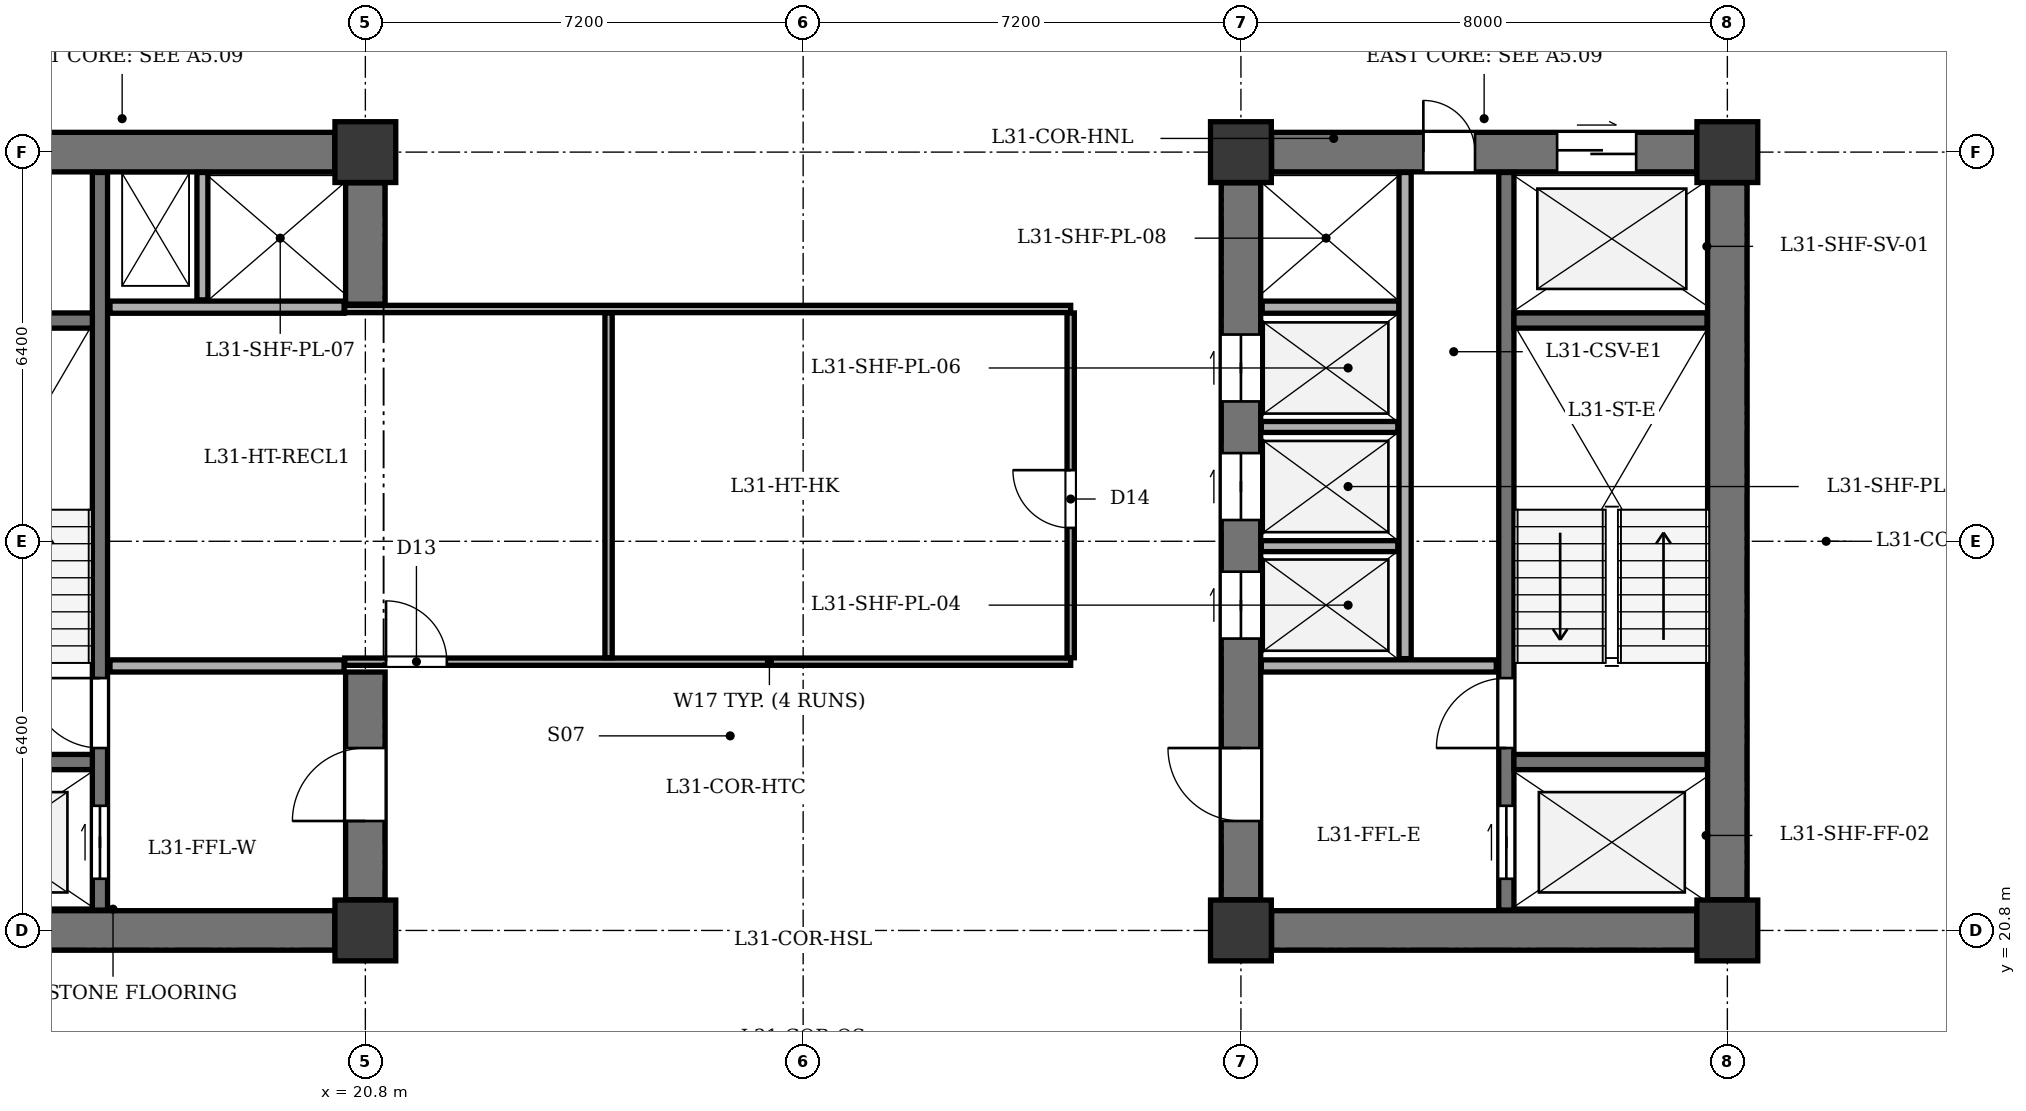
"""IFC4 building model, lengths in metres.
Left out: names, types, materials, properties, quantities, classifications, styles, units other than length and angle.
Written with IfcOpenShell. Run it as: python <this file> out.ifc"""

import sys

from ifc_helpers import new_model, si_unit, direction, frame, frame_2d, origin, origin_2d, place, context, subcontext, project, spatial, rectangle, extrude, element, fill, save


model = new_model("IFC4")
c1 = context("Model", 3, precision=1e-05, world=origin(), true_north=direction((0.0, 1.0)))
c2 = subcontext(c1, "Body", "Model", "MODEL_VIEW")
j1 = project(units=[si_unit("LENGTHUNIT", "METRE"), si_unit("PLANEANGLEUNIT", "RADIAN")], contexts=[c1])
p1 = place(None, origin())
s1 = spatial("IfcSite", under=j1, at=p1, CompositionType="ELEMENT")
p2 = place(p1, origin())
s2 = spatial("IfcBuilding", under=s1, at=p2, CompositionType="ELEMENT")
p3 = place(p2, frame((0.0, 0.0, 127.3)))
s3 = spatial("IfcBuildingStorey", under=s2, at=p3, CompositionType="ELEMENT", Elevation=127.3)
for number, where, z_axis, x_axis in (
    (1, (20.8, 20.8, 0.0), (0.0, 0.0, 1.0), (1.0, 0.0, 0.0)),
    (2, (20.8, 33.6, 0.0), (0.0, 0.0, 1.0), (1.0, 0.0, 0.0)),
    (3, (35.2, 20.8, 0.0), (0.0, 0.0, 1.0), (1.0, 0.0, 0.0)),
    (4, (43.2, 20.8, 0.0), (0.0, 0.0, 1.0), (1.0, 0.0, 0.0)),
    (5, (35.2, 33.6, 0.0), (0.0, 0.0, 1.0), (1.0, 0.0, 0.0)),
    (6, (43.2, 33.6, 0.0), (0.0, 0.0, 1.0), (1.0, 0.0, 0.0)),
):
    element("IfcColumn", number, at=place(p3, frame(where, z_axis=z_axis, x_axis=x_axis)), inside=s3, PredefinedType="COLUMN", context=c2, shape_type="SweptSolid", body=[
        extrude(rectangle(XDim=1.0, YDim=1.0, at=origin_2d()), origin(), (0.0, 0.0, 1.0), 3.5),
    ])
p4 = place(p3, frame((13.305, 20.8, 0.0), z_axis=(0.0, 0.0, 1.0), x_axis=(1.0, 0.0, 0.0)))
e7 = element("IfcWall", 7, at=p4, inside=s3, PredefinedType="SHEAR", context=c2, shape_type="SweptSolid", body=[
    extrude(rectangle(XDim=6.99, YDim=0.65, at=frame_2d((3.495, 0.0))), origin(), (0.0, 0.0, 1.0), 3.2),
])
p5 = place(p3, frame((13.305, 33.6, 0.0), z_axis=(0.0, 0.0, 1.0), x_axis=(1.0, 0.0, 0.0)))
e8 = element("IfcWall", 8, at=p5, inside=s3, PredefinedType="SHEAR", context=c2, shape_type="SweptSolid", body=[
    extrude(rectangle(XDim=6.99, YDim=0.65, at=frame_2d((3.495, 0.0))), origin(), (0.0, 0.0, 1.0), 3.2),
])
p6 = place(p5, frame((1.095, 0.0, 0.0)))
e9 = element("IfcOpeningElement", 9, at=p6, cuts=e8, PredefinedType="OPENING", context=c2, shape_type="SweptSolid", body=[
    extrude(rectangle(XDim=0.85, YDim=2.02, at=frame_2d((0.425, 1.01))), frame((0.0, 0.335, 0.0), z_axis=(0.0, -1.0, 0.0), x_axis=(1.0, 0.0, 0.0)), (0.0, 0.0, 1.0), 0.67),
])
p7 = place(p3, frame((20.8, 21.305, 0.0), z_axis=(0.0, 0.0, 1.0), x_axis=(0.0, 1.0, 0.0)))
e10 = element("IfcWall", 10, at=p7, inside=s3, PredefinedType="SHEAR", context=c2, shape_type="SweptSolid", body=[
    extrude(rectangle(XDim=3.745, YDim=0.65, at=frame_2d((1.873, 0.0))), origin(), (0.0, 0.0, 1.0), 3.2),
])
p8 = place(p7, frame((1.295, 0.0, 0.0)))
e11 = element("IfcOpeningElement", 11, at=p8, cuts=e10, PredefinedType="OPENING", context=c2, shape_type="SweptSolid", body=[
    extrude(rectangle(XDim=1.2, YDim=2.15, at=frame_2d((0.6, 1.075))), frame((0.0, 0.335, 0.0), z_axis=(0.0, -1.0, 0.0), x_axis=(1.0, 0.0, 0.0)), (0.0, 0.0, 1.0), 0.67),
])
p9 = place(p3, frame((20.8, 31.1, 0.0), z_axis=(0.0, 0.0, 1.0), x_axis=(0.0, 1.0, 0.0)))
e12 = element("IfcWall", 12, at=p9, inside=s3, PredefinedType="SHEAR", context=c2, shape_type="SweptSolid", body=[
    extrude(rectangle(XDim=1.995, YDim=0.65, at=frame_2d((0.998, 0.0))), origin(), (0.0, 0.0, 1.0), 3.2),
])
p10 = place(p3, frame((16.435, 21.135, 0.0), z_axis=(0.0, 0.0, 1.0), x_axis=(0.0, 1.0, 0.0)))
e13 = element("IfcWall", 13, at=p10, inside=s3, PredefinedType="SHEAR", context=c2, shape_type="SweptSolid", body=[
    extrude(rectangle(XDim=12.13, YDim=0.25, at=frame_2d((6.065, 0.0))), origin(), (0.0, 0.0, 1.0), 3.2),
])
p11 = place(p10, frame((0.515, 0.0, 0.0)))
e14 = element("IfcOpeningElement", 14, at=p11, cuts=e13, PredefinedType="OPENING", context=c2, shape_type="SweptSolid", body=[
    extrude(rectangle(XDim=1.2, YDim=2.15, at=frame_2d((0.6, 1.075))), frame((0.0, 0.135, 0.0), z_axis=(0.0, -1.0, 0.0), x_axis=(1.0, 0.0, 0.0)), (0.0, 0.0, 1.0), 0.27),
])
p12 = place(p10, frame((2.665, 0.0, 0.0)))
e15 = element("IfcOpeningElement", 15, at=p12, cuts=e13, PredefinedType="OPENING", context=c2, shape_type="SweptSolid", body=[
    extrude(rectangle(XDim=1.15, YDim=2.15, at=frame_2d((0.575, 1.075))), frame((0.0, 0.135, 0.0), z_axis=(0.0, -1.0, 0.0), x_axis=(1.0, 0.0, 0.0)), (0.0, 0.0, 1.0), 0.27),
])
for number, where, z_axis, x_axis in (
    (16, (13.135, 23.57, 0.0), (0.0, 0.0, 1.0), (1.0, 0.0, 0.0)),
    (17, (13.135, 30.83, 0.0), (0.0, 0.0, 1.0), (1.0, 0.0, 0.0)),
):
    element("IfcWall", number, at=place(p3, frame(where, z_axis=z_axis, x_axis=x_axis)), inside=s3, PredefinedType="SHEAR", context=c2, shape_type="SweptSolid", body=[
        extrude(rectangle(XDim=3.175, YDim=0.25, at=frame_2d((1.587, 0.0))), origin(), (0.0, 0.0, 1.0), 3.2),
    ])
for number, where, z_axis, x_axis in (
    (18, (16.6, 25.15, 0.0), (0.0, 0.0, 1.0), (1.0, 0.0, 0.0)),
    (19, (16.6, 31.05, 0.0), (0.0, 0.0, 1.0), (1.0, 0.0, 0.0)),
):
    element("IfcWall", number, at=place(p3, frame(where, z_axis=z_axis, x_axis=x_axis)), inside=s3, PredefinedType="SOLIDWALL", context=c2, shape_type="SweptSolid", body=[
        extrude(rectangle(XDim=3.85, YDim=0.2, at=frame_2d((1.925, 0.0))), origin(), (0.0, 0.0, 1.0), 3.2),
    ])
p13 = place(p3, frame((18.12, 31.17, 0.0), z_axis=(0.0, 0.0, 1.0), x_axis=(0.0, 1.0, 0.0)))
e20 = element("IfcWall", 20, at=p13, inside=s3, PredefinedType="PARTITIONING", context=c2, shape_type="SweptSolid", body=[
    extrude(rectangle(XDim=2.095, YDim=0.18, at=frame_2d((1.047, 0.0))), origin(), (0.0, 0.0, 1.0), 3.2),
])
p14 = place(p3, frame((43.2, 21.305, 0.0), z_axis=(0.0, 0.0, 1.0), x_axis=(0.0, 1.0, 0.0)))
e21 = element("IfcWall", 21, at=p14, inside=s3, PredefinedType="SHEAR", context=c2, shape_type="SweptSolid", body=[
    extrude(rectangle(XDim=11.79, YDim=0.65, at=frame_2d((5.895, 0.0))), origin(), (0.0, 0.0, 1.0), 3.2),
])
p15 = place(p3, frame((35.705, 20.8, 0.0), z_axis=(0.0, 0.0, 1.0), x_axis=(1.0, 0.0, 0.0)))
e22 = element("IfcWall", 22, at=p15, inside=s3, PredefinedType="SHEAR", context=c2, shape_type="SweptSolid", body=[
    extrude(rectangle(XDim=6.99, YDim=0.65, at=frame_2d((3.495, 0.0))), origin(), (0.0, 0.0, 1.0), 3.2),
])
p16 = place(p3, frame((35.705, 33.6, 0.0), z_axis=(0.0, 0.0, 1.0), x_axis=(1.0, 0.0, 0.0)))
e23 = element("IfcWall", 23, at=p16, inside=s3, PredefinedType="SHEAR", context=c2, shape_type="SweptSolid", body=[
    extrude(rectangle(XDim=6.99, YDim=0.65, at=frame_2d((3.495, 0.0))), origin(), (0.0, 0.0, 1.0), 3.2),
])
p17 = place(p16, frame((4.695, 0.0, 0.0)))
e24 = element("IfcOpeningElement", 24, at=p17, cuts=e23, PredefinedType="OPENING", context=c2, shape_type="SweptSolid", body=[
    extrude(rectangle(XDim=1.3, YDim=2.15, at=frame_2d((0.65, 1.075))), frame((0.0, 0.335, 0.0), z_axis=(0.0, -1.0, 0.0), x_axis=(1.0, 0.0, 0.0)), (0.0, 0.0, 1.0), 0.67),
])
p18 = place(p16, frame((2.495, 0.0, 0.0)))
e25 = element("IfcOpeningElement", 25, at=p18, cuts=e23, PredefinedType="OPENING", context=c2, shape_type="SweptSolid", body=[
    extrude(rectangle(XDim=0.85, YDim=2.02, at=frame_2d((0.425, 1.01))), frame((0.0, 0.335, 0.0), z_axis=(0.0, -1.0, 0.0), x_axis=(1.0, 0.0, 0.0)), (0.0, 0.0, 1.0), 0.67),
])
p19 = place(p3, frame((35.2, 21.305, 0.0), z_axis=(0.0, 0.0, 1.0), x_axis=(0.0, 1.0, 0.0)))
e26 = element("IfcWall", 26, at=p19, inside=s3, PredefinedType="SHEAR", context=c2, shape_type="SweptSolid", body=[
    extrude(rectangle(XDim=11.79, YDim=0.65, at=frame_2d((5.895, 0.0))), origin(), (0.0, 0.0, 1.0), 3.2),
])
p20 = place(p19, frame((1.295, 0.0, 0.0)))
e27 = element("IfcOpeningElement", 27, at=p20, cuts=e26, PredefinedType="OPENING", context=c2, shape_type="SweptSolid", body=[
    extrude(rectangle(XDim=1.2, YDim=2.15, at=frame_2d((0.6, 1.075))), frame((0.0, 0.335, 0.0), z_axis=(0.0, -1.0, 0.0), x_axis=(1.0, 0.0, 0.0)), (0.0, 0.0, 1.0), 0.67),
])
p21 = place(p19, frame((4.295, 0.0, 0.0)))
e28 = element("IfcOpeningElement", 28, at=p21, cuts=e26, PredefinedType="OPENING", context=c2, shape_type="SweptSolid", body=[
    extrude(rectangle(XDim=1.1, YDim=2.1, at=frame_2d((0.55, 1.05))), frame((0.0, 0.335, 0.0), z_axis=(0.0, -1.0, 0.0), x_axis=(1.0, 0.0, 0.0)), (0.0, 0.0, 1.0), 0.67),
])
p22 = place(p19, frame((6.245, 0.0, 0.0)))
e29 = element("IfcOpeningElement", 29, at=p22, cuts=e26, PredefinedType="OPENING", context=c2, shape_type="SweptSolid", body=[
    extrude(rectangle(XDim=1.1, YDim=2.1, at=frame_2d((0.55, 1.05))), frame((0.0, 0.335, 0.0), z_axis=(0.0, -1.0, 0.0), x_axis=(1.0, 0.0, 0.0)), (0.0, 0.0, 1.0), 0.67),
])
p23 = place(p19, frame((8.195, 0.0, 0.0)))
e30 = element("IfcOpeningElement", 30, at=p23, cuts=e26, PredefinedType="OPENING", context=c2, shape_type="SweptSolid", body=[
    extrude(rectangle(XDim=1.1, YDim=2.1, at=frame_2d((0.55, 1.05))), frame((0.0, 0.335, 0.0), z_axis=(0.0, -1.0, 0.0), x_axis=(1.0, 0.0, 0.0)), (0.0, 0.0, 1.0), 0.67),
])
p24 = place(p3, frame((39.565, 21.135, 0.0), z_axis=(0.0, 0.0, 1.0), x_axis=(0.0, 1.0, 0.0)))
e31 = element("IfcWall", 31, at=p24, inside=s3, PredefinedType="SHEAR", context=c2, shape_type="SweptSolid", body=[
    extrude(rectangle(XDim=12.13, YDim=0.25, at=frame_2d((6.065, 0.0))), origin(), (0.0, 0.0, 1.0), 3.2),
])
p25 = place(p24, frame((0.515, 0.0, 0.0)))
e32 = element("IfcOpeningElement", 32, at=p25, cuts=e31, PredefinedType="OPENING", context=c2, shape_type="SweptSolid", body=[
    extrude(rectangle(XDim=1.2, YDim=2.15, at=frame_2d((0.6, 1.075))), frame((0.0, 0.135, 0.0), z_axis=(0.0, -1.0, 0.0), x_axis=(1.0, 0.0, 0.0)), (0.0, 0.0, 1.0), 0.27),
])
p26 = place(p24, frame((2.665, 0.0, 0.0)))
e33 = element("IfcOpeningElement", 33, at=p26, cuts=e31, PredefinedType="OPENING", context=c2, shape_type="SweptSolid", body=[
    extrude(rectangle(XDim=1.15, YDim=2.15, at=frame_2d((0.575, 1.075))), frame((0.0, 0.135, 0.0), z_axis=(0.0, -1.0, 0.0), x_axis=(1.0, 0.0, 0.0)), (0.0, 0.0, 1.0), 0.27),
])
for number, where, z_axis, x_axis in (
    (34, (39.69, 23.57, 0.0), (0.0, 0.0, 1.0), (1.0, 0.0, 0.0)),
    (35, (39.69, 30.83, 0.0), (0.0, 0.0, 1.0), (1.0, 0.0, 0.0)),
):
    element("IfcWall", number, at=place(p3, frame(where, z_axis=z_axis, x_axis=x_axis)), inside=s3, PredefinedType="SHEAR", context=c2, shape_type="SweptSolid", body=[
        extrude(rectangle(XDim=3.175, YDim=0.25, at=frame_2d((1.587, 0.0))), origin(), (0.0, 0.0, 1.0), 3.2),
    ])
p27 = place(p3, frame((35.535, 25.15, 0.0), z_axis=(0.0, 0.0, 1.0), x_axis=(1.0, 0.0, 0.0)))
e36 = element("IfcWall", 36, at=p27, inside=s3, PredefinedType="SOLIDWALL", context=c2, shape_type="SweptSolid", body=[
    extrude(rectangle(XDim=3.865, YDim=0.2, at=frame_2d((1.933, 0.0))), origin(), (0.0, 0.0, 1.0), 3.2),
])
p28 = place(p3, frame((35.55, 31.05, 0.0), z_axis=(0.0, 0.0, 1.0), x_axis=(1.0, 0.0, 0.0)))
e37 = element("IfcWall", 37, at=p28, inside=s3, PredefinedType="SOLIDWALL", context=c2, shape_type="SweptSolid", body=[
    extrude(rectangle(XDim=2.25, YDim=0.2, at=frame_2d((1.125, 0.0))), origin(), (0.0, 0.0, 1.0), 3.2),
])
p29 = place(p3, frame((37.9, 25.27, 0.0), z_axis=(0.0, 0.0, 1.0), x_axis=(0.0, 1.0, 0.0)))
e38 = element("IfcWall", 38, at=p29, inside=s3, PredefinedType="SOLIDWALL", context=c2, shape_type="SweptSolid", body=[
    extrude(rectangle(XDim=7.995, YDim=0.2, at=frame_2d((3.998, 0.0))), origin(), (0.0, 0.0, 1.0), 3.2),
])
for number, where, z_axis, x_axis in (
    (39, (35.535, 27.12, 0.0), (0.0, 0.0, 1.0), (1.0, 0.0, 0.0)),
    (40, (35.535, 29.08, 0.0), (0.0, 0.0, 1.0), (1.0, 0.0, 0.0)),
):
    element("IfcWall", number, at=place(p3, frame(where, z_axis=z_axis, x_axis=x_axis)), inside=s3, PredefinedType="PARTITIONING", context=c2, shape_type="SweptSolid", body=[
        extrude(rectangle(XDim=2.245, YDim=0.18, at=frame_2d((1.123, 0.0))), origin(), (0.0, 0.0, 1.0), 3.2),
    ])
p30 = place(p3, frame((20.46, 25.22, 0.0), z_axis=(0.0, 0.0, 1.0), x_axis=(1.0, 0.0, 0.0)))
e41 = element("IfcWall", 41, at=p30, inside=s3, PredefinedType="PARTITIONING", context=c2, shape_type="SweptSolid", body=[
    extrude(rectangle(XDim=11.94, YDim=0.12, at=frame_2d((5.97, 0.0))), origin(), (0.0, 0.0, 1.0), 3.2),
])
p31 = place(p30, frame((0.68, 0.0, 0.0)))
e42 = element("IfcOpeningElement", 42, at=p31, cuts=e41, PredefinedType="OPENING", context=c2, shape_type="SweptSolid", body=[
    extrude(rectangle(XDim=1.0, YDim=2.1, at=frame_2d((0.5, 1.05))), frame((0.0, 0.07, 0.0), z_axis=(0.0, -1.0, 0.0), x_axis=(1.0, 0.0, 0.0)), (0.0, 0.0, 1.0), 0.14),
])
p32 = place(p3, frame((20.46, 31.02, 0.0), z_axis=(0.0, 0.0, 1.0), x_axis=(1.0, 0.0, 0.0)))
e43 = element("IfcWall", 43, at=p32, inside=s3, PredefinedType="PARTITIONING", context=c2, shape_type="SweptSolid", body=[
    extrude(rectangle(XDim=11.94, YDim=0.12, at=frame_2d((5.97, 0.0))), origin(), (0.0, 0.0, 1.0), 3.2),
])
p33 = place(p3, frame((32.4, 25.285, 0.0), z_axis=(0.0, 0.0, 1.0), x_axis=(0.0, 1.0, 0.0)))
e44 = element("IfcWall", 44, at=p33, inside=s3, PredefinedType="PARTITIONING", context=c2, shape_type="SweptSolid", body=[
    extrude(rectangle(XDim=5.67, YDim=0.12, at=frame_2d((2.835, 0.0))), origin(), (0.0, 0.0, 1.0), 3.2),
])
p34 = place(p33, frame((2.135, 0.0, 0.0)))
e45 = element("IfcOpeningElement", 45, at=p34, cuts=e44, PredefinedType="OPENING", context=c2, shape_type="SweptSolid", body=[
    extrude(rectangle(XDim=0.95, YDim=2.1, at=frame_2d((0.475, 1.05))), frame((0.0, 0.07, 0.0), z_axis=(0.0, -1.0, 0.0), x_axis=(1.0, 0.0, 0.0)), (0.0, 0.0, 1.0), 0.14),
])
p35 = place(p3, frame((24.8, 25.285, 0.0), z_axis=(0.0, 0.0, 1.0), x_axis=(0.0, 1.0, 0.0)))
e46 = element("IfcWall", 46, at=p35, inside=s3, PredefinedType="PARTITIONING", context=c2, shape_type="SweptSolid", body=[
    extrude(rectangle(XDim=5.67, YDim=0.12, at=frame_2d((2.835, 0.0))), origin(), (0.0, 0.0, 1.0), 3.2),
])
p36 = place(p8, origin())
e47 = element("IfcDoor", 47, at=p36, inside=s3, OperationType="SINGLE_SWING_LEFT", PredefinedType="DOOR", context=c2, shape_type="SweptSolid", body=[
    extrude(rectangle(XDim=1.2, YDim=2.15, at=frame_2d((0.6, 1.075))), frame((0.0, 0.025, 0.0), z_axis=(0.0, -1.0, 0.0), x_axis=(1.0, 0.0, 0.0)), (0.0, 0.0, 1.0), 0.05),
])
fill(e11, e47)
p37 = place(p11, origin())
e48 = element("IfcDoor", 48, at=p37, inside=s3, OperationType="DOUBLE_DOOR_SLIDING", PredefinedType="DOOR", context=c2, shape_type="SweptSolid", body=[
    extrude(rectangle(XDim=1.2, YDim=2.15, at=frame_2d((0.6, 1.075))), frame((0.0, 0.025, 0.0), z_axis=(0.0, -1.0, 0.0), x_axis=(1.0, 0.0, 0.0)), (0.0, 0.0, 1.0), 0.05),
])
fill(e14, e48)
p38 = place(p12, origin())
e49 = element("IfcDoor", 49, at=p38, inside=s3, OperationType="SINGLE_SWING_RIGHT", PredefinedType="DOOR", context=c2, shape_type="SweptSolid", body=[
    extrude(rectangle(XDim=1.15, YDim=2.15, at=frame_2d((0.575, 1.075))), frame((0.0, 0.025, 0.0), z_axis=(0.0, -1.0, 0.0), x_axis=(1.0, 0.0, 0.0)), (0.0, 0.0, 1.0), 0.05),
])
fill(e15, e49)
p39 = place(p17, origin())
e50 = element("IfcDoor", 50, at=p39, inside=s3, OperationType="DOUBLE_DOOR_SLIDING", PredefinedType="DOOR", context=c2, shape_type="SweptSolid", body=[
    extrude(rectangle(XDim=1.3, YDim=2.15, at=frame_2d((0.65, 1.075))), frame((0.0, 0.025, 0.0), z_axis=(0.0, -1.0, 0.0), x_axis=(1.0, 0.0, 0.0)), (0.0, 0.0, 1.0), 0.05),
])
fill(e24, e50)
p40 = place(p18, origin())
e51 = element("IfcDoor", 51, at=p40, inside=s3, OperationType="SINGLE_SWING_LEFT", PredefinedType="DOOR", context=c2, shape_type="SweptSolid", body=[
    extrude(rectangle(XDim=0.85, YDim=2.02, at=frame_2d((0.425, 1.01))), frame((0.0, 0.025, 0.0), z_axis=(0.0, -1.0, 0.0), x_axis=(1.0, 0.0, 0.0)), (0.0, 0.0, 1.0), 0.05),
])
fill(e25, e51)
p41 = place(p20, origin())
e52 = element("IfcDoor", 52, at=p41, inside=s3, OperationType="SINGLE_SWING_RIGHT", PredefinedType="DOOR", context=c2, shape_type="SweptSolid", body=[
    extrude(rectangle(XDim=1.2, YDim=2.15, at=frame_2d((0.6, 1.075))), frame((0.0, 0.025, 0.0), z_axis=(0.0, -1.0, 0.0), x_axis=(1.0, 0.0, 0.0)), (0.0, 0.0, 1.0), 0.05),
])
fill(e27, e52)
p42 = place(p21, origin())
e53 = element("IfcDoor", 53, at=p42, inside=s3, OperationType="DOUBLE_DOOR_SLIDING", PredefinedType="DOOR", context=c2, shape_type="SweptSolid", body=[
    extrude(rectangle(XDim=1.1, YDim=2.1, at=frame_2d((0.55, 1.05))), frame((0.0, 0.025, 0.0), z_axis=(0.0, -1.0, 0.0), x_axis=(1.0, 0.0, 0.0)), (0.0, 0.0, 1.0), 0.05),
])
fill(e28, e53)
p43 = place(p22, origin())
e54 = element("IfcDoor", 54, at=p43, inside=s3, OperationType="DOUBLE_DOOR_SLIDING", PredefinedType="DOOR", context=c2, shape_type="SweptSolid", body=[
    extrude(rectangle(XDim=1.1, YDim=2.1, at=frame_2d((0.55, 1.05))), frame((0.0, 0.025, 0.0), z_axis=(0.0, -1.0, 0.0), x_axis=(1.0, 0.0, 0.0)), (0.0, 0.0, 1.0), 0.05),
])
fill(e29, e54)
p44 = place(p23, origin())
e55 = element("IfcDoor", 55, at=p44, inside=s3, OperationType="DOUBLE_DOOR_SLIDING", PredefinedType="DOOR", context=c2, shape_type="SweptSolid", body=[
    extrude(rectangle(XDim=1.1, YDim=2.1, at=frame_2d((0.55, 1.05))), frame((0.0, 0.025, 0.0), z_axis=(0.0, -1.0, 0.0), x_axis=(1.0, 0.0, 0.0)), (0.0, 0.0, 1.0), 0.05),
])
fill(e30, e55)
p45 = place(p25, origin())
e56 = element("IfcDoor", 56, at=p45, inside=s3, OperationType="DOUBLE_DOOR_SLIDING", PredefinedType="DOOR", context=c2, shape_type="SweptSolid", body=[
    extrude(rectangle(XDim=1.2, YDim=2.15, at=frame_2d((0.6, 1.075))), frame((0.0, 0.025, 0.0), z_axis=(0.0, -1.0, 0.0), x_axis=(1.0, 0.0, 0.0)), (0.0, 0.0, 1.0), 0.05),
])
fill(e32, e56)
p46 = place(p26, origin())
e57 = element("IfcDoor", 57, at=p46, inside=s3, OperationType="SINGLE_SWING_LEFT", PredefinedType="DOOR", context=c2, shape_type="SweptSolid", body=[
    extrude(rectangle(XDim=1.15, YDim=2.15, at=frame_2d((0.575, 1.075))), frame((0.0, 0.025, 0.0), z_axis=(0.0, -1.0, 0.0), x_axis=(1.0, 0.0, 0.0)), (0.0, 0.0, 1.0), 0.05),
])
fill(e33, e57)
p47 = place(p31, origin())
e58 = element("IfcDoor", 58, at=p47, inside=s3, OperationType="SINGLE_SWING_LEFT", PredefinedType="DOOR", context=c2, shape_type="SweptSolid", body=[
    extrude(rectangle(XDim=1.0, YDim=2.1, at=frame_2d((0.5, 1.05))), frame((0.0, 0.025, 0.0), z_axis=(0.0, -1.0, 0.0), x_axis=(1.0, 0.0, 0.0)), (0.0, 0.0, 1.0), 0.05),
])
fill(e42, e58)
p48 = place(p34, origin())
e59 = element("IfcDoor", 59, at=p48, inside=s3, OperationType="SINGLE_SWING_RIGHT", PredefinedType="DOOR", context=c2, shape_type="SweptSolid", body=[
    extrude(rectangle(XDim=0.95, YDim=2.1, at=frame_2d((0.475, 1.05))), frame((0.0, 0.025, 0.0), z_axis=(0.0, -1.0, 0.0), x_axis=(1.0, 0.0, 0.0)), (0.0, 0.0, 1.0), 0.05),
])
fill(e45, e59)
save(model, sys.argv[1])
